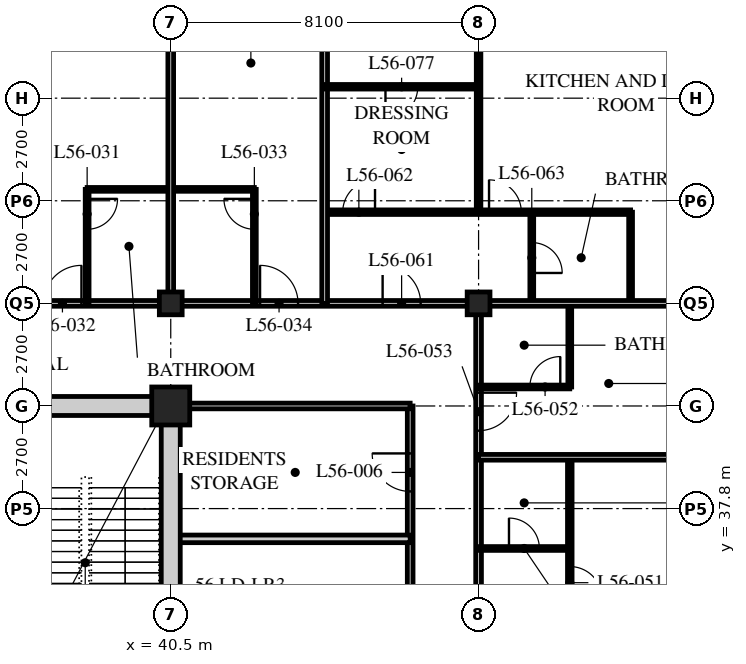
"""IFC4 building model, lengths in metres.
Left out: names, types, materials, properties, quantities, classifications, styles, units other than length and angle.
Written with IfcOpenShell. Run it as: python <this file> out.ifc"""

import sys

from ifc_helpers import new_model, si_unit, direction, frame, frame_2d, origin, origin_2d, place, context, subcontext, project, spatial, rectangle, hollow_rectangle, extrude, element, fill, save


model = new_model("IFC4")
c1 = context("Model", 3, precision=1e-05, world=origin(), true_north=direction((0.0, 1.0)))
c2 = subcontext(c1, "Body", "Model", "MODEL_VIEW")
j1 = project(units=[si_unit("LENGTHUNIT", "METRE"), si_unit("PLANEANGLEUNIT", "RADIAN")], contexts=[c1])
p1 = place(None, origin())
s1 = spatial("IfcSite", under=j1, at=p1, CompositionType="ELEMENT")
p2 = place(p1, origin())
s2 = spatial("IfcBuilding", under=s1, at=p2, CompositionType="ELEMENT")
p3 = place(p2, frame((0.0, 0.0, 217.2)))
s3 = spatial("IfcBuildingStorey", under=s2, at=p3, CompositionType="ELEMENT", Elevation=217.2)
p4 = place(p3, frame((40.5, 40.5, 0.0), z_axis=(0.0, 0.0, 1.0), x_axis=(1.0, 0.0, 0.0)))
e1 = element("IfcColumn", 1, at=p4, inside=s3, PredefinedType="COLUMN", context=c2, shape_type="SweptSolid", body=[
    extrude(hollow_rectangle(XDim=1.0, YDim=1.0, WallThickness=0.1, at=origin_2d()), origin(), (0.0, 0.0, 1.0), 3.6),
])
for number, where, z_axis, x_axis in (
    (2, (40.5, 43.2, 0.0), (0.0, 0.0, 1.0), (1.0, 0.0, 0.0)),
    (3, (48.6, 43.2, 0.0), (0.0, 0.0, 1.0), (1.0, 0.0, 0.0)),
):
    element("IfcColumn", number, at=place(p3, frame(where, z_axis=z_axis, x_axis=x_axis)), inside=s3, PredefinedType="COLUMN", context=c2, shape_type="SweptSolid", body=[
        extrude(hollow_rectangle(XDim=0.6, YDim=0.6, WallThickness=0.05, at=origin_2d()), origin(), (0.0, 0.0, 1.0), 3.6),
    ])
p5 = place(p3, frame((12.15, 43.2, 0.0), z_axis=(0.0, 0.0, 1.0), x_axis=(1.0, 0.0, 0.0)))
e4 = element("IfcWall", 4, at=p5, inside=s3, PredefinedType="PARTITIONING", context=c2, shape_type="SweptSolid", body=[
    extrude(rectangle(XDim=36.45, YDim=0.15, at=frame_2d((18.225, 0.0))), origin(), (0.0, 0.0, 1.0), 2.778),
])
p6 = place(p5, frame((4.95, 0.0, 0.0)))
e5 = element("IfcOpeningElement", 5, at=p6, cuts=e4, PredefinedType="OPENING", context=c2, shape_type="SweptSolid", body=[
    extrude(rectangle(XDim=1.0, YDim=2.1, at=frame_2d((0.5, 1.05))), frame((0.0, 0.085, 0.0), z_axis=(0.0, -1.0, 0.0), x_axis=(1.0, 0.0, 0.0)), (0.0, 0.0, 1.0), 0.17),
])
p7 = place(p5, frame((25.0, 0.0, 0.0)))
e6 = element("IfcOpeningElement", 6, at=p7, cuts=e4, PredefinedType="OPENING", context=c2, shape_type="SweptSolid", body=[
    extrude(rectangle(XDim=1.0, YDim=2.1, at=frame_2d((0.5, 1.05))), frame((0.0, 0.085, 0.0), z_axis=(0.0, -1.0, 0.0), x_axis=(1.0, 0.0, 0.0)), (0.0, 0.0, 1.0), 0.17),
])
p8 = place(p5, frame((30.7, 0.0, 0.0)))
e7 = element("IfcOpeningElement", 7, at=p8, cuts=e4, PredefinedType="OPENING", context=c2, shape_type="SweptSolid", body=[
    extrude(rectangle(XDim=1.0, YDim=2.1, at=frame_2d((0.5, 1.05))), frame((0.0, 0.085, 0.0), z_axis=(0.0, -1.0, 0.0), x_axis=(1.0, 0.0, 0.0)), (0.0, 0.0, 1.0), 0.17),
])
p9 = place(p5, frame((33.925, 0.0, 0.0)))
e8 = element("IfcOpeningElement", 8, at=p9, cuts=e4, PredefinedType="OPENING", context=c2, shape_type="SweptSolid", body=[
    extrude(rectangle(XDim=1.0, YDim=2.1, at=frame_2d((0.5, 1.05))), frame((0.0, 0.085, 0.0), z_axis=(0.0, -1.0, 0.0), x_axis=(1.0, 0.0, 0.0)), (0.0, 0.0, 1.0), 0.17),
])
p10 = place(p5, frame((1.525, 0.0, 0.0)))
e9 = element("IfcOpeningElement", 9, at=p10, cuts=e4, PredefinedType="OPENING", context=c2, shape_type="SweptSolid", body=[
    extrude(rectangle(XDim=1.0, YDim=2.1, at=frame_2d((0.5, 1.05))), frame((0.0, 0.085, 0.0), z_axis=(0.0, -1.0, 0.0), x_axis=(1.0, 0.0, 0.0)), (0.0, 0.0, 1.0), 0.17),
])
p11 = place(p3, frame((48.6, 18.9, 0.0), z_axis=(0.0, 0.0, 1.0), x_axis=(0.0, 1.0, 0.0)))
e10 = element("IfcWall", 10, at=p11, inside=s3, PredefinedType="PARTITIONING", context=c2, shape_type="SweptSolid", body=[
    extrude(rectangle(XDim=24.3, YDim=0.15, at=frame_2d((12.15, 0.0))), origin(), (0.0, 0.0, 1.0), 2.778),
])
p12 = place(p11, frame((0.9, 0.0, 0.0)))
e11 = element("IfcOpeningElement", 11, at=p12, cuts=e10, PredefinedType="OPENING", context=c2, shape_type="SweptSolid", body=[
    extrude(rectangle(XDim=1.0, YDim=2.1, at=frame_2d((0.5, 1.05))), frame((0.0, 0.085, 0.0), z_axis=(0.0, -1.0, 0.0), x_axis=(1.0, 0.0, 0.0)), (0.0, 0.0, 1.0), 0.17),
])
p13 = place(p11, frame((20.95, 0.0, 0.0)))
e12 = element("IfcOpeningElement", 12, at=p13, cuts=e10, PredefinedType="OPENING", context=c2, shape_type="SweptSolid", body=[
    extrude(rectangle(XDim=1.0, YDim=2.1, at=frame_2d((0.5, 1.05))), frame((0.0, 0.085, 0.0), z_axis=(0.0, -1.0, 0.0), x_axis=(1.0, 0.0, 0.0)), (0.0, 0.0, 1.0), 0.17),
])
p14 = place(p3, frame((46.8, 20.7, 0.0), z_axis=(0.0, 0.0, 1.0), x_axis=(0.0, 1.0, 0.0)))
e13 = element("IfcWall", 13, at=p14, inside=s3, PredefinedType="PARTITIONING", context=c2, shape_type="SweptSolid", body=[
    extrude(rectangle(XDim=19.8, YDim=0.15, at=frame_2d((9.9, 0.0))), origin(), (0.0, 0.0, 1.0), 3.39),
])
p15 = place(p14, frame((4.052, 0.0, 0.0)))
e14 = element("IfcOpeningElement", 14, at=p15, cuts=e13, PredefinedType="OPENING", context=c2, shape_type="SweptSolid", body=[
    extrude(rectangle(XDim=1.0, YDim=2.1, at=frame_2d((0.5, 1.05))), frame((0.0, 0.085, 0.0), z_axis=(0.0, -1.0, 0.0), x_axis=(1.0, 0.0, 0.0)), (0.0, 0.0, 1.0), 0.17),
])
p16 = place(p14, frame((8.102, 0.0, 0.0)))
e15 = element("IfcOpeningElement", 15, at=p16, cuts=e13, PredefinedType="OPENING", context=c2, shape_type="SweptSolid", body=[
    extrude(rectangle(XDim=1.0, YDim=2.1, at=frame_2d((0.5, 1.05))), frame((0.0, 0.085, 0.0), z_axis=(0.0, -1.0, 0.0), x_axis=(1.0, 0.0, 0.0)), (0.0, 0.0, 1.0), 0.17),
])
p17 = place(p14, frame((13.502, 0.0, 0.0)))
e16 = element("IfcOpeningElement", 16, at=p17, cuts=e13, PredefinedType="OPENING", context=c2, shape_type="SweptSolid", body=[
    extrude(rectangle(XDim=1.0, YDim=2.1, at=frame_2d((0.5, 1.05))), frame((0.0, 0.085, 0.0), z_axis=(0.0, -1.0, 0.0), x_axis=(1.0, 0.0, 0.0)), (0.0, 0.0, 1.0), 0.17),
])
p18 = place(p14, frame((17.552, 0.0, 0.0)))
e17 = element("IfcOpeningElement", 17, at=p18, cuts=e13, PredefinedType="OPENING", context=c2, shape_type="SweptSolid", body=[
    extrude(rectangle(XDim=1.0, YDim=2.1, at=frame_2d((0.5, 1.05))), frame((0.0, 0.085, 0.0), z_axis=(0.0, -1.0, 0.0), x_axis=(1.0, 0.0, 0.0)), (0.0, 0.0, 1.0), 0.17),
])
p19 = place(p3, frame((46.8, 40.5, 0.0), z_axis=(0.0, 0.0, 1.0), x_axis=(-1.0, 0.0, 0.0)))
e18 = element("IfcWall", 18, at=p19, inside=s3, PredefinedType="PARTITIONING", context=c2, shape_type="SweptSolid", body=[
    extrude(rectangle(XDim=6.1, YDim=0.15, at=frame_2d((3.05, 0.0))), origin(), (0.0, 0.0, 1.0), 3.39),
])
p20 = place(p3, frame((46.8, 37.003, 0.0), z_axis=(0.0, 0.0, 1.0), x_axis=(-1.0, 0.0, 0.0)))
e19 = element("IfcWall", 19, at=p20, inside=s3, PredefinedType="SOLIDWALL", context=c2, shape_type="SweptSolid", body=[
    extrude(rectangle(XDim=6.3, YDim=0.2, at=frame_2d((3.15, 0.0))), origin(), (0.0, 0.0, 1.0), 3.39),
])
p21 = place(p3, frame((38.3, 46.2, 0.0), z_axis=(0.0, 0.0, 1.0), x_axis=(1.0, 0.0, 0.0)))
e20 = element("IfcWall", 20, at=p21, inside=s3, PredefinedType="PARTITIONING", context=c2, shape_type="SweptSolid", body=[
    extrude(rectangle(XDim=4.4, YDim=0.1, at=frame_2d((2.2, 0.0))), origin(), (0.0, 0.0, 1.0), 3.39),
])
p22 = place(p3, frame((38.3, 43.2, 0.0), z_axis=(0.0, 0.0, 1.0), x_axis=(0.0, 1.0, 0.0)))
e21 = element("IfcWall", 21, at=p22, inside=s3, PredefinedType="PARTITIONING", context=c2, shape_type="SweptSolid", body=[
    extrude(rectangle(XDim=3.0, YDim=0.1, at=frame_2d((1.5, 0.0))), origin(), (0.0, 0.0, 1.0), 3.39),
])
p23 = place(p22, frame((1.95, 0.0, 0.0)))
e22 = element("IfcOpeningElement", 22, at=p23, cuts=e21, PredefinedType="OPENING", context=c2, shape_type="SweptSolid", body=[
    extrude(rectangle(XDim=0.8, YDim=2.1, at=frame_2d((0.4, 1.05))), frame((0.0, 0.06, 0.0), z_axis=(0.0, -1.0, 0.0), x_axis=(1.0, 0.0, 0.0)), (0.0, 0.0, 1.0), 0.12),
])
p24 = place(p3, frame((40.5, 43.2, 0.0), z_axis=(0.0, 0.0, 1.0), x_axis=(0.0, 1.0, 0.0)))
e23 = element("IfcWall", 23, at=p24, inside=s3, PredefinedType="PARTITIONING", context=c2, shape_type="SweptSolid", body=[
    extrude(rectangle(XDim=15.9, YDim=0.15, at=frame_2d((7.95, 0.0))), origin(), (0.0, 0.0, 1.0), 2.778),
])
p25 = place(p3, frame((42.7, 43.2, 0.0), z_axis=(0.0, 0.0, 1.0), x_axis=(0.0, 1.0, 0.0)))
e24 = element("IfcWall", 24, at=p25, inside=s3, PredefinedType="PARTITIONING", context=c2, shape_type="SweptSolid", body=[
    extrude(rectangle(XDim=3.0, YDim=0.1, at=frame_2d((1.5, 0.0))), origin(), (0.0, 0.0, 1.0), 3.39),
])
p26 = place(p25, frame((1.95, 0.0, 0.0)))
e25 = element("IfcOpeningElement", 25, at=p26, cuts=e24, PredefinedType="OPENING", context=c2, shape_type="SweptSolid", body=[
    extrude(rectangle(XDim=0.8, YDim=2.1, at=frame_2d((0.4, 1.05))), frame((0.0, 0.06, 0.0), z_axis=(0.0, -1.0, 0.0), x_axis=(1.0, 0.0, 0.0)), (0.0, 0.0, 1.0), 0.12),
])
p27 = place(p3, frame((51.0, 18.9, 0.0), z_axis=(0.0, 0.0, 1.0), x_axis=(0.0, 1.0, 0.0)))
e26 = element("IfcWall", 26, at=p27, inside=s3, PredefinedType="PARTITIONING", context=c2, shape_type="SweptSolid", body=[
    extrude(rectangle(XDim=20.25, YDim=0.12, at=frame_2d((10.125, 0.0))), origin(), (0.0, 0.0, 1.0), 3.39),
])
p28 = place(p27, frame((0.975, 0.0, 0.0)))
e27 = element("IfcOpeningElement", 27, at=p28, cuts=e26, PredefinedType="OPENING", context=c2, shape_type="SweptSolid", body=[
    extrude(rectangle(XDim=0.85, YDim=2.1, at=frame_2d((0.425, 1.05))), frame((0.0, 0.07, 0.0), z_axis=(0.0, -1.0, 0.0), x_axis=(1.0, 0.0, 0.0)), (0.0, 0.0, 1.0), 0.14),
])
p29 = place(p27, frame((8.425, 0.0, 0.0)))
e28 = element("IfcOpeningElement", 28, at=p29, cuts=e26, PredefinedType="OPENING", context=c2, shape_type="SweptSolid", body=[
    extrude(rectangle(XDim=0.85, YDim=2.1, at=frame_2d((0.425, 1.05))), frame((0.0, 0.07, 0.0), z_axis=(0.0, -1.0, 0.0), x_axis=(1.0, 0.0, 0.0)), (0.0, 0.0, 1.0), 0.14),
])
p30 = place(p27, frame((12.475, 0.0, 0.0)))
e29 = element("IfcOpeningElement", 29, at=p30, cuts=e26, PredefinedType="OPENING", context=c2, shape_type="SweptSolid", body=[
    extrude(rectangle(XDim=0.85, YDim=2.1, at=frame_2d((0.425, 1.05))), frame((0.0, 0.07, 0.0), z_axis=(0.0, -1.0, 0.0), x_axis=(1.0, 0.0, 0.0)), (0.0, 0.0, 1.0), 0.14),
])
p31 = place(p27, frame((16.525, 0.0, 0.0)))
e30 = element("IfcOpeningElement", 30, at=p31, cuts=e26, PredefinedType="OPENING", context=c2, shape_type="SweptSolid", body=[
    extrude(rectangle(XDim=0.85, YDim=2.1, at=frame_2d((0.425, 1.05))), frame((0.0, 0.07, 0.0), z_axis=(0.0, -1.0, 0.0), x_axis=(1.0, 0.0, 0.0)), (0.0, 0.0, 1.0), 0.14),
])
p32 = place(p3, frame((48.6, 36.75, 0.0), z_axis=(0.0, 0.0, 1.0), x_axis=(1.0, 0.0, 0.0)))
e31 = element("IfcWall", 31, at=p32, inside=s3, PredefinedType="PARTITIONING", context=c2, shape_type="SweptSolid", body=[
    extrude(rectangle(XDim=2.4, YDim=0.1, at=frame_2d((1.2, 0.0))), origin(), (0.0, 0.0, 1.0), 3.39),
])
p33 = place(p32, frame((0.8, 0.0, 0.0)))
e32 = element("IfcOpeningElement", 32, at=p33, cuts=e31, PredefinedType="OPENING", context=c2, shape_type="SweptSolid", body=[
    extrude(rectangle(XDim=0.8, YDim=2.1, at=frame_2d((0.4, 1.05))), frame((0.0, 0.06, 0.0), z_axis=(0.0, -1.0, 0.0), x_axis=(1.0, 0.0, 0.0)), (0.0, 0.0, 1.0), 0.12),
])
p34 = place(p3, frame((48.6, 39.15, 0.0), z_axis=(0.0, 0.0, 1.0), x_axis=(1.0, 0.0, 0.0)))
e33 = element("IfcWall", 33, at=p34, inside=s3, PredefinedType="PARTITIONING", context=c2, shape_type="SweptSolid", body=[
    extrude(rectangle(XDim=7.8, YDim=0.15, at=frame_2d((3.9, 0.0))), origin(), (0.0, 0.0, 1.0), 3.39),
])
p35 = place(p3, frame((51.0, 41.0, 0.0), z_axis=(0.0, 0.0, 1.0), x_axis=(0.0, 1.0, 0.0)))
e34 = element("IfcWall", 34, at=p35, inside=s3, PredefinedType="PARTITIONING", context=c2, shape_type="SweptSolid", body=[
    extrude(rectangle(XDim=2.2, YDim=0.1, at=frame_2d((1.1, 0.0))), origin(), (0.0, 0.0, 1.0), 3.39),
])
p36 = place(p3, frame((48.6, 41.0, 0.0), z_axis=(0.0, 0.0, 1.0), x_axis=(1.0, 0.0, 0.0)))
e35 = element("IfcWall", 35, at=p36, inside=s3, PredefinedType="PARTITIONING", context=c2, shape_type="SweptSolid", body=[
    extrude(rectangle(XDim=2.4, YDim=0.1, at=frame_2d((1.2, 0.0))), origin(), (0.0, 0.0, 1.0), 3.39),
])
p37 = place(p36, frame((1.35, 0.0, 0.0)))
e36 = element("IfcOpeningElement", 36, at=p37, cuts=e35, PredefinedType="OPENING", context=c2, shape_type="SweptSolid", body=[
    extrude(rectangle(XDim=0.8, YDim=2.1, at=frame_2d((0.4, 1.05))), frame((0.0, 0.06, 0.0), z_axis=(0.0, -1.0, 0.0), x_axis=(1.0, 0.0, 0.0)), (0.0, 0.0, 1.0), 0.12),
])
p38 = place(p3, frame((44.55, 45.6, 0.0), z_axis=(0.0, 0.0, 1.0), x_axis=(1.0, 0.0, 0.0)))
e37 = element("IfcWall", 37, at=p38, inside=s3, PredefinedType="PARTITIONING", context=c2, shape_type="SweptSolid", body=[
    extrude(rectangle(XDim=8.05, YDim=0.12, at=frame_2d((4.025, 0.0))), origin(), (0.0, 0.0, 1.0), 3.39),
])
p39 = place(p38, frame((0.475, 0.0, 0.0)))
e38 = element("IfcOpeningElement", 38, at=p39, cuts=e37, PredefinedType="OPENING", context=c2, shape_type="SweptSolid", body=[
    extrude(rectangle(XDim=0.85, YDim=2.1, at=frame_2d((0.425, 1.05))), frame((0.0, 0.07, 0.0), z_axis=(0.0, -1.0, 0.0), x_axis=(1.0, 0.0, 0.0)), (0.0, 0.0, 1.0), 0.14),
])
p40 = place(p38, frame((4.325, 0.0, 0.0)))
e39 = element("IfcOpeningElement", 39, at=p40, cuts=e37, PredefinedType="OPENING", context=c2, shape_type="SweptSolid", body=[
    extrude(rectangle(XDim=0.85, YDim=2.1, at=frame_2d((0.425, 1.05))), frame((0.0, 0.07, 0.0), z_axis=(0.0, -1.0, 0.0), x_axis=(1.0, 0.0, 0.0)), (0.0, 0.0, 1.0), 0.14),
])
p41 = place(p3, frame((50.0, 43.2, 0.0), z_axis=(0.0, 0.0, 1.0), x_axis=(0.0, 1.0, 0.0)))
e40 = element("IfcWall", 40, at=p41, inside=s3, PredefinedType="PARTITIONING", context=c2, shape_type="SweptSolid", body=[
    extrude(rectangle(XDim=2.4, YDim=0.1, at=frame_2d((1.2, 0.0))), origin(), (0.0, 0.0, 1.0), 3.39),
])
p42 = place(p41, frame((0.8, 0.0, 0.0)))
e41 = element("IfcOpeningElement", 41, at=p42, cuts=e40, PredefinedType="OPENING", context=c2, shape_type="SweptSolid", body=[
    extrude(rectangle(XDim=0.8, YDim=2.1, at=frame_2d((0.4, 1.05))), frame((0.0, 0.06, 0.0), z_axis=(0.0, -1.0, 0.0), x_axis=(1.0, 0.0, 0.0)), (0.0, 0.0, 1.0), 0.12),
])
p43 = place(p3, frame((52.6, 43.2, 0.0), z_axis=(0.0, 0.0, 1.0), x_axis=(0.0, 1.0, 0.0)))
e42 = element("IfcWall", 42, at=p43, inside=s3, PredefinedType="PARTITIONING", context=c2, shape_type="SweptSolid", body=[
    extrude(rectangle(XDim=2.4, YDim=0.1, at=frame_2d((1.2, 0.0))), origin(), (0.0, 0.0, 1.0), 3.39),
])
p44 = place(p3, frame((48.6, 45.6, 0.0), z_axis=(0.0, 0.0, 1.0), x_axis=(0.0, 1.0, 0.0)))
e43 = element("IfcWall", 43, at=p44, inside=s3, PredefinedType="PARTITIONING", context=c2, shape_type="SweptSolid", body=[
    extrude(rectangle(XDim=9.45, YDim=0.12, at=frame_2d((4.725, 0.0))), origin(), (0.0, 0.0, 1.0), 2.778),
])
p45 = place(p3, frame((48.6, 43.2, 0.0), z_axis=(0.0, 0.0, 1.0), x_axis=(1.0, 0.0, 0.0)))
e44 = element("IfcWall", 44, at=p45, inside=s3, PredefinedType="PARTITIONING", context=c2, shape_type="SweptSolid", body=[
    extrude(rectangle(XDim=7.8, YDim=0.15, at=frame_2d((3.9, 0.0))), origin(), (0.0, 0.0, 1.0), 2.778),
])
p46 = place(p3, frame((44.55, 43.2, 0.0), z_axis=(0.0, 0.0, 1.0), x_axis=(0.0, 1.0, 0.0)))
e45 = element("IfcWall", 45, at=p46, inside=s3, PredefinedType="PARTITIONING", context=c2, shape_type="SweptSolid", body=[
    extrude(rectangle(XDim=15.9, YDim=0.15, at=frame_2d((7.95, 0.0))), origin(), (0.0, 0.0, 1.0), 3.39),
])
p47 = place(p3, frame((44.55, 48.9, 0.0), z_axis=(0.0, 0.0, 1.0), x_axis=(1.0, 0.0, 0.0)))
e46 = element("IfcWall", 46, at=p47, inside=s3, PredefinedType="PARTITIONING", context=c2, shape_type="SweptSolid", body=[
    extrude(rectangle(XDim=4.05, YDim=0.12, at=frame_2d((2.025, 0.0))), origin(), (0.0, 0.0, 1.0), 3.39),
])
p48 = place(p47, frame((1.6, 0.0, 0.0)))
e47 = element("IfcOpeningElement", 47, at=p48, cuts=e46, PredefinedType="OPENING", context=c2, shape_type="SweptSolid", body=[
    extrude(rectangle(XDim=0.85, YDim=2.1, at=frame_2d((0.425, 1.05))), frame((0.0, 0.07, 0.0), z_axis=(0.0, -1.0, 0.0), x_axis=(1.0, 0.0, 0.0)), (0.0, 0.0, 1.0), 0.14),
])
p49 = place(p3, frame((15.95, 40.5, 0.0), z_axis=(0.0, 0.0, 1.0), x_axis=(1.0, 0.0, 0.0)))
e48 = element("IfcWall", 48, at=p49, inside=s3, PredefinedType="SOLIDWALL", context=c2, shape_type="SweptSolid", body=[
    extrude(rectangle(XDim=24.8, YDim=0.5, at=frame_2d((12.4, 0.0))), origin(), (0.0, 0.0, 1.0), 2.74),
])
p50 = place(p49, frame((11.5, 0.0, 0.0)))
e49 = element("IfcOpeningElement", 49, at=p50, cuts=e48, PredefinedType="OPENING", context=c2, shape_type="SweptSolid", body=[
    extrude(rectangle(XDim=1.8, YDim=2.4, at=frame_2d((0.9, 1.2))), frame((0.0, 0.26, 0.0), z_axis=(0.0, -1.0, 0.0), x_axis=(1.0, 0.0, 0.0)), (0.0, 0.0, 1.0), 0.52),
])
p51 = place(p3, frame((40.5, 24.55, 0.0), z_axis=(0.0, 0.0, 1.0), x_axis=(0.0, 1.0, 0.0)))
e50 = element("IfcWall", 50, at=p51, inside=s3, PredefinedType="SOLIDWALL", context=c2, shape_type="SweptSolid", body=[
    extrude(rectangle(XDim=15.7, YDim=0.5, at=frame_2d((7.85, 0.0))), origin(), (0.0, 0.0, 1.0), 2.778),
])
p52 = place(p18, origin())
e51 = element("IfcDoor", 51, at=p52, inside=s3, OperationType="SINGLE_SWING_RIGHT", PredefinedType="DOOR", context=c2, shape_type="SweptSolid", body=[
    extrude(rectangle(XDim=1.0, YDim=2.1, at=frame_2d((0.5, 1.05))), frame((0.0, 0.025, 0.0), z_axis=(0.0, -1.0, 0.0), x_axis=(1.0, 0.0, 0.0)), (0.0, 0.0, 1.0), 0.05),
])
fill(e17, e51)
p53 = place(p23, origin())
e52 = element("IfcDoor", 52, at=p53, inside=s3, OperationType="SINGLE_SWING_LEFT", PredefinedType="DOOR", context=c2, shape_type="SweptSolid", body=[
    extrude(rectangle(XDim=0.8, YDim=2.1, at=frame_2d((0.4, 1.05))), frame((0.0, 0.025, 0.0), z_axis=(0.0, -1.0, 0.0), x_axis=(1.0, 0.0, 0.0)), (0.0, 0.0, 1.0), 0.05),
])
fill(e22, e52)
p54 = place(p7, origin())
e53 = element("IfcDoor", 53, at=p54, inside=s3, OperationType="SINGLE_SWING_RIGHT", PredefinedType="DOOR", context=c2, shape_type="SweptSolid", body=[
    extrude(rectangle(XDim=1.0, YDim=2.1, at=frame_2d((0.5, 1.05))), frame((0.0, 0.025, 0.0), z_axis=(0.0, -1.0, 0.0), x_axis=(1.0, 0.0, 0.0)), (0.0, 0.0, 1.0), 0.05),
])
fill(e6, e53)
p55 = place(p26, origin())
e54 = element("IfcDoor", 54, at=p55, inside=s3, OperationType="SINGLE_SWING_RIGHT", PredefinedType="DOOR", context=c2, shape_type="SweptSolid", body=[
    extrude(rectangle(XDim=0.8, YDim=2.1, at=frame_2d((0.4, 1.05))), frame((0.0, 0.025, 0.0), z_axis=(0.0, -1.0, 0.0), x_axis=(1.0, 0.0, 0.0)), (0.0, 0.0, 1.0), 0.05),
])
fill(e25, e54)
p56 = place(p8, origin())
e55 = element("IfcDoor", 55, at=p56, inside=s3, OperationType="SINGLE_SWING_LEFT", PredefinedType="DOOR", context=c2, shape_type="SweptSolid", body=[
    extrude(rectangle(XDim=1.0, YDim=2.1, at=frame_2d((0.5, 1.05))), frame((0.0, 0.025, 0.0), z_axis=(0.0, -1.0, 0.0), x_axis=(1.0, 0.0, 0.0)), (0.0, 0.0, 1.0), 0.05),
])
fill(e7, e55)
p57 = place(p33, origin())
e56 = element("IfcDoor", 56, at=p57, inside=s3, OperationType="SINGLE_SWING_LEFT", PredefinedType="DOOR", context=c2, shape_type="SweptSolid", body=[
    extrude(rectangle(XDim=0.8, YDim=2.1, at=frame_2d((0.4, 1.05))), frame((0.0, 0.025, 0.0), z_axis=(0.0, -1.0, 0.0), x_axis=(1.0, 0.0, 0.0)), (0.0, 0.0, 1.0), 0.05),
])
fill(e32, e56)
p58 = place(p31, origin())
e57 = element("IfcDoor", 57, at=p58, inside=s3, OperationType="SINGLE_SWING_RIGHT", PredefinedType="DOOR", context=c2, shape_type="SweptSolid", body=[
    extrude(rectangle(XDim=0.85, YDim=2.1, at=frame_2d((0.425, 1.05))), frame((0.0, 0.025, 0.0), z_axis=(0.0, -1.0, 0.0), x_axis=(1.0, 0.0, 0.0)), (0.0, 0.0, 1.0), 0.05),
])
fill(e30, e57)
p59 = place(p37, origin())
e58 = element("IfcDoor", 58, at=p59, inside=s3, OperationType="SINGLE_SWING_RIGHT", PredefinedType="DOOR", context=c2, shape_type="SweptSolid", body=[
    extrude(rectangle(XDim=0.8, YDim=2.1, at=frame_2d((0.4, 1.05))), frame((0.0, 0.025, 0.0), z_axis=(0.0, -1.0, 0.0), x_axis=(1.0, 0.0, 0.0)), (0.0, 0.0, 1.0), 0.05),
])
fill(e36, e58)
p60 = place(p13, origin())
e59 = element("IfcDoor", 59, at=p60, inside=s3, OperationType="SINGLE_SWING_LEFT", PredefinedType="DOOR", context=c2, shape_type="SweptSolid", body=[
    extrude(rectangle(XDim=1.0, YDim=2.1, at=frame_2d((0.5, 1.05))), frame((0.0, 0.025, 0.0), z_axis=(0.0, -1.0, 0.0), x_axis=(1.0, 0.0, 0.0)), (0.0, 0.0, 1.0), 0.05),
])
fill(e12, e59)
p61 = place(p9, origin())
e60 = element("IfcDoor", 60, at=p61, inside=s3, OperationType="SINGLE_SWING_LEFT", PredefinedType="DOOR", context=c2, shape_type="SweptSolid", body=[
    extrude(rectangle(XDim=1.0, YDim=2.1, at=frame_2d((0.5, 1.05))), frame((0.0, 0.025, 0.0), z_axis=(0.0, -1.0, 0.0), x_axis=(1.0, 0.0, 0.0)), (0.0, 0.0, 1.0), 0.05),
])
fill(e8, e60)
p62 = place(p39, origin())
e61 = element("IfcDoor", 61, at=p62, inside=s3, OperationType="SINGLE_SWING_RIGHT", PredefinedType="DOOR", context=c2, shape_type="SweptSolid", body=[
    extrude(rectangle(XDim=0.85, YDim=2.1, at=frame_2d((0.425, 1.05))), frame((0.0, 0.025, 0.0), z_axis=(0.0, -1.0, 0.0), x_axis=(1.0, 0.0, 0.0)), (0.0, 0.0, 1.0), 0.05),
])
fill(e38, e61)
p63 = place(p42, origin())
e62 = element("IfcDoor", 62, at=p63, inside=s3, OperationType="SINGLE_SWING_RIGHT", PredefinedType="DOOR", context=c2, shape_type="SweptSolid", body=[
    extrude(rectangle(XDim=0.8, YDim=2.1, at=frame_2d((0.4, 1.05))), frame((0.0, 0.025, 0.0), z_axis=(0.0, -1.0, 0.0), x_axis=(1.0, 0.0, 0.0)), (0.0, 0.0, 1.0), 0.05),
])
fill(e41, e62)
p64 = place(p40, origin())
e63 = element("IfcDoor", 63, at=p64, inside=s3, OperationType="SINGLE_SWING_LEFT", PredefinedType="DOOR", context=c2, shape_type="SweptSolid", body=[
    extrude(rectangle(XDim=0.85, YDim=2.1, at=frame_2d((0.425, 1.05))), frame((0.0, 0.025, 0.0), z_axis=(0.0, -1.0, 0.0), x_axis=(1.0, 0.0, 0.0)), (0.0, 0.0, 1.0), 0.05),
])
fill(e39, e63)
p65 = place(p48, origin())
e64 = element("IfcDoor", 64, at=p65, inside=s3, OperationType="SINGLE_SWING_RIGHT", PredefinedType="DOOR", context=c2, shape_type="SweptSolid", body=[
    extrude(rectangle(XDim=0.85, YDim=2.1, at=frame_2d((0.425, 1.05))), frame((0.0, 0.025, 0.0), z_axis=(0.0, -1.0, 0.0), x_axis=(1.0, 0.0, 0.0)), (0.0, 0.0, 1.0), 0.05),
])
fill(e47, e64)
save(model, sys.argv[1])
